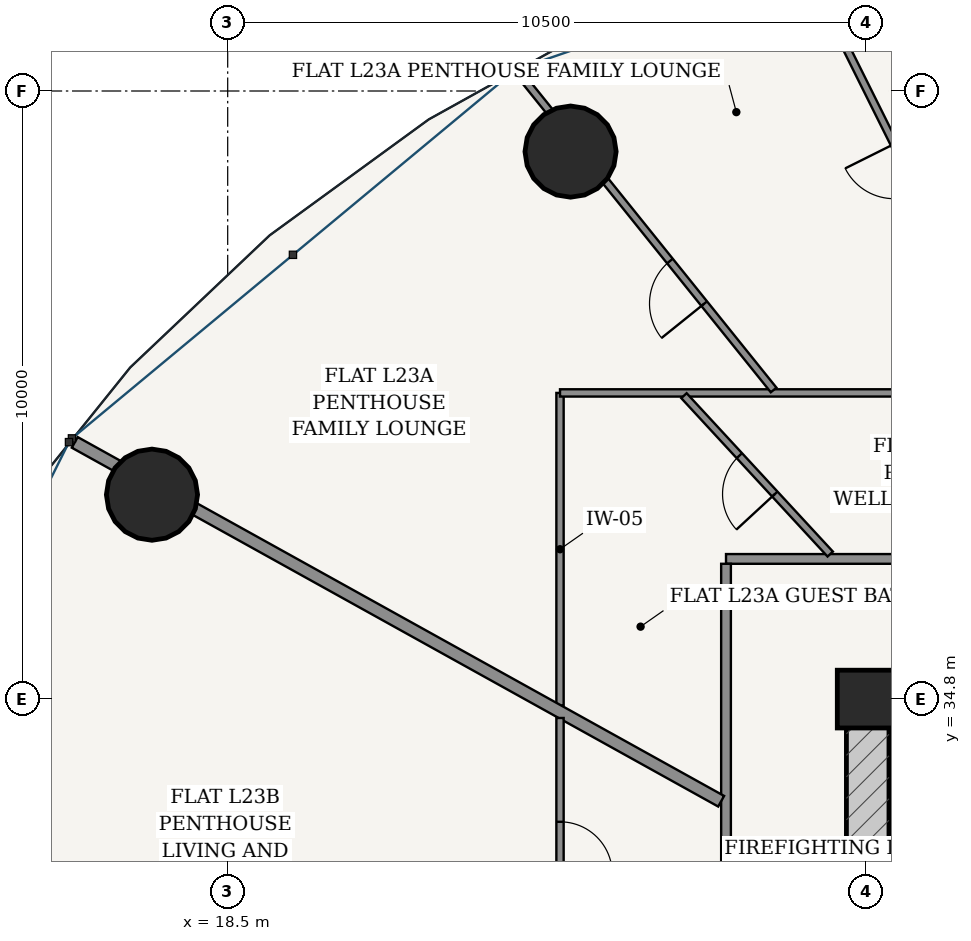
"""IFC4 building model, lengths in metres.
Left out: names, types, materials, properties, quantities, classifications, styles, units other than length and angle.
Written with IfcOpenShell. Run it as: python <this file> out.ifc"""

import sys

from ifc_helpers import new_model, si_unit, direction, frame, frame_2d, origin, origin_2d, place, context, subcontext, project, spatial, rectangle, hollow_circle, extrude, source, transform, mapped, element, fill, save


model = new_model("IFC4")
c1 = context("Model", 3, precision=1e-05, world=origin(), true_north=direction((-0.2419218956, 0.970295726276)))
c2 = subcontext(c1, "Body", "Model", "MODEL_VIEW")
j1 = project(units=[si_unit("LENGTHUNIT", "METRE"), si_unit("PLANEANGLEUNIT", "RADIAN")], contexts=[c1])
p1 = place(None, origin())
s1 = spatial("IfcSite", under=j1, at=p1, CompositionType="ELEMENT")
p2 = place(p1, origin())
s2 = spatial("IfcBuilding", under=s1, at=p2, CompositionType="ELEMENT")
p3 = place(p2, frame((0.0, 0.0, 90.6)))
s3 = spatial("IfcBuildingStorey", under=s2, at=p3, CompositionType="ELEMENT", Elevation=90.6)
p4 = place(p3, frame((29.0, 34.8, 0.0), z_axis=(0.0, 0.0, 1.0), x_axis=(1.0, 0.0, 0.0)))
e1 = element("IfcColumn", 1, at=p4, inside=s3, PredefinedType="COLUMN", context=c2, shape_type="SweptSolid", body=[
    extrude(rectangle(XDim=0.95, YDim=0.95, at=origin_2d()), origin(), (0.0, 0.0, 1.0), 3.6),
])
p5 = place(p3, frame((28.675, 34.775, 0.0), z_axis=(0.0, 0.0, 1.0), x_axis=(1.0, 0.0, 0.0)))
e2 = element("IfcWall", 2, at=p5, inside=s3, PredefinedType="SHEAR", context=c2, shape_type="SweptSolid", body=[
    extrude(rectangle(XDim=18.65, YDim=0.7, at=frame_2d((9.325, 0.0))), origin(), (0.0, 0.0, 1.0), 3.325),
])
p6 = place(p5, frame((8.9, 0.0, 0.0)))
e3 = element("IfcOpeningElement", 3, at=p6, cuts=e2, PredefinedType="OPENING", context=c2, shape_type="SweptSolid", body=[
    extrude(rectangle(XDim=0.85, YDim=2.1, at=frame_2d((0.425, 1.05))), frame((0.0, 0.36, 0.0), z_axis=(0.0, -1.0, 0.0), x_axis=(1.0, 0.0, 0.0)), (0.0, 0.0, 1.0), 0.72),
])
p7 = place(p3, frame((29.025, 19.175, 0.0), z_axis=(0.0, 0.0, 1.0), x_axis=(0.0, 1.0, 0.0)))
e4 = element("IfcWall", 4, at=p7, inside=s3, PredefinedType="SHEAR", context=c2, shape_type="SweptSolid", body=[
    extrude(rectangle(XDim=15.25, YDim=0.7, at=frame_2d((7.625, 0.0))), origin(), (0.0, 0.0, 1.0), 3.325),
])
p8 = place(p7, frame((9.875, 0.0, 0.0)))
e5 = element("IfcOpeningElement", 5, at=p8, cuts=e4, PredefinedType="OPENING", context=c2, shape_type="SweptSolid", body=[
    extrude(rectangle(XDim=1.5, YDim=2.2, at=frame_2d((0.75, 1.1))), frame((0.0, 0.36, 0.0), z_axis=(0.0, -1.0, 0.0), x_axis=(1.0, 0.0, 0.0)), (0.0, 0.0, 1.0), 0.72),
])
for number, where, z_axis, x_axis in (
    (6, (24.138, 43.803, 0.0), (0.0, 0.0, 1.0), (1.0, 0.0, 0.0)),
    (7, (17.255, 38.161, 0.0), (0.0, 0.0, 1.0), (1.0, 0.0, 0.0)),
):
    element("IfcColumn", number, at=place(p3, frame(where, z_axis=z_axis, x_axis=x_axis)), inside=s3, PredefinedType="COLUMN", context=c2, shape_type="SweptSolid", body=[
        extrude(hollow_circle(Radius=0.75, WallThickness=0.045, at=origin_2d()), origin(), (0.0, 0.0, 1.0), 3.6),
    ])
p9 = place(p3, frame((26.695, 37.105, 0.0), z_axis=(0.0, 0.0, 1.0), x_axis=(1.0, 0.0, 0.0)))
e8 = element("IfcWall", 8, at=p9, inside=s3, PredefinedType="PARTITIONING", context=c2, shape_type="SweptSolid", body=[
    extrude(rectangle(XDim=22.61, YDim=0.16, at=frame_2d((11.305, 0.0))), origin(), (0.0, 0.0, 1.0), 2.767),
])
p10 = place(p9, frame((18.058, 0.0, 0.0)))
e9 = element("IfcOpeningElement", 9, at=p10, cuts=e8, PredefinedType="OPENING", context=c2, shape_type="SweptSolid", body=[
    extrude(rectangle(XDim=0.98, YDim=2.2, at=frame_2d((0.49, 1.1))), frame((0.0, 0.09, 0.0), z_axis=(0.0, -1.0, 0.0), x_axis=(1.0, 0.0, 0.0)), (0.0, 0.0, 1.0), 0.18),
])
p11 = place(p3, frame((26.695, 16.575, 0.0), z_axis=(0.0, 0.0, 1.0), x_axis=(0.0, 1.0, 0.0)))
e10 = element("IfcWall", 10, at=p11, inside=s3, PredefinedType="PARTITIONING", context=c2, shape_type="SweptSolid", body=[
    extrude(rectangle(XDim=20.45, YDim=0.16, at=frame_2d((10.225, 0.0))), origin(), (0.0, 0.0, 1.0), 2.767),
])
p12 = place(p3, frame((23.965, 34.693, 0.0), z_axis=(0.0, 0.0, 1.0), x_axis=(0.0, 1.0, 0.0)))
e11 = element("IfcWall", 11, at=p12, inside=s3, PredefinedType="PARTITIONING", context=c2, shape_type="SweptSolid", body=[
    extrude(rectangle(XDim=5.142, YDim=0.12, at=frame_2d((2.571, 0.0))), origin(), (0.0, 0.0, 1.0), 3.004),
])
p13 = place(p3, frame((23.965, 39.835, 0.0), z_axis=(0.0, 0.0, 1.0), x_axis=(1.0, 0.0, 0.0)))
e12 = element("IfcWall", 12, at=p13, inside=s3, PredefinedType="PARTITIONING", context=c2, shape_type="SweptSolid", body=[
    extrude(rectangle(XDim=28.07, YDim=0.12, at=frame_2d((14.035, 0.0))), origin(), (0.0, 0.0, 1.0), 2.767),
])
p14 = place(p13, frame((23.442, 0.0, 0.0)))
e13 = element("IfcOpeningElement", 13, at=p14, cuts=e12, PredefinedType="OPENING", context=c2, shape_type="SweptSolid", body=[
    extrude(rectangle(XDim=0.9, YDim=2.15, at=frame_2d((0.45, 1.075))), frame((0.0, 0.07, 0.0), z_axis=(0.0, -1.0, 0.0), x_axis=(1.0, 0.0, 0.0)), (0.0, 0.0, 1.0), 0.14),
])
p15 = place(p3, frame((31.474, 39.89, 0.0), z_axis=(0.0, 0.0, 1.0), x_axis=(-0.446167584581, 0.894949432353, 0.0)))
e14 = element("IfcWall", 14, at=p15, inside=s3, PredefinedType="PARTITIONING", context=c2, shape_type="SweptSolid", body=[
    extrude(rectangle(XDim=8.125, YDim=0.12, at=frame_2d((4.062, 0.0))), origin(), (0.0, 0.0, 1.0), 2.767),
])
p16 = place(p15, frame((3.612, 0.0, 0.0)))
e15 = element("IfcOpeningElement", 15, at=p16, cuts=e14, PredefinedType="OPENING", context=c2, shape_type="SweptSolid", body=[
    extrude(rectangle(XDim=0.9, YDim=2.15, at=frame_2d((0.45, 1.075))), frame((0.0, 0.07, 0.0), z_axis=(0.0, -1.0, 0.0), x_axis=(1.0, 0.0, 0.0)), (0.0, 0.0, 1.0), 0.14),
])
p17 = place(p3, frame((27.478, 39.883, 0.0), z_axis=(0.0, 0.0, 1.0), x_axis=(-0.62672583251, 0.779239841682, 0.0)))
e16 = element("IfcWall", 16, at=p17, inside=s3, PredefinedType="PARTITIONING", context=c2, shape_type="SweptSolid", body=[
    extrude(rectangle(XDim=6.678, YDim=0.12, at=frame_2d((3.339, 0.0))), origin(), (0.0, 0.0, 1.0), 2.767),
])
p18 = place(p17, frame((1.821, 0.0, 0.0)))
e17 = element("IfcOpeningElement", 17, at=p18, cuts=e16, PredefinedType="OPENING", context=c2, shape_type="SweptSolid", body=[
    extrude(rectangle(XDim=0.9, YDim=2.15, at=frame_2d((0.45, 1.075))), frame((0.0, 0.07, 0.0), z_axis=(0.0, -1.0, 0.0), x_axis=(1.0, 0.0, 0.0)), (0.0, 0.0, 1.0), 0.14),
])
p19 = place(p3, frame((28.409, 37.185, 0.0), z_axis=(0.0, 0.0, 1.0), x_axis=(-0.678451695105, 0.734645014554, 0.0)))
e18 = element("IfcWall", 18, at=p19, inside=s3, PredefinedType="PARTITIONING", context=c2, shape_type="SweptSolid", body=[
    extrude(rectangle(XDim=3.545, YDim=0.12, at=frame_2d((1.772, 0.0))), origin(), (0.0, 0.0, 1.0), 2.767),
])
p20 = place(p19, frame((1.343, 0.0, 0.0)))
e19 = element("IfcOpeningElement", 19, at=p20, cuts=e18, PredefinedType="OPENING", context=c2, shape_type="SweptSolid", body=[
    extrude(rectangle(XDim=0.86, YDim=2.15, at=frame_2d((0.43, 1.075))), frame((0.0, 0.07, 0.0), z_axis=(0.0, -1.0, 0.0), x_axis=(1.0, 0.0, 0.0)), (0.0, 0.0, 1.0), 0.14),
])
p21 = place(p3, frame((26.615, 33.12, 0.0), z_axis=(0.0, 0.0, 1.0), x_axis=(-0.874319192772, 0.485351366692, 0.0)))
e20 = element("IfcWall", 20, at=p21, inside=s3, PredefinedType="PARTITIONING", context=c2, shape_type="SweptSolid", body=[
    extrude(rectangle(XDim=12.158, YDim=0.2, at=frame_2d((6.079, 0.0))), origin(), (0.0, 0.0, 1.0), 2.767),
])
p22 = place(p3, frame((23.965, 13.765, 0.0), z_axis=(0.0, 0.0, 1.0), x_axis=(0.0, 1.0, 0.0)))
e21 = element("IfcWall", 21, at=p22, inside=s3, PredefinedType="PARTITIONING", context=c2, shape_type="SweptSolid", body=[
    extrude(rectangle(XDim=20.725, YDim=0.12, at=frame_2d((10.362, 0.0))), origin(), (0.0, 0.0, 1.0), 2.767),
])
p23 = place(p22, frame((9.401, 0.0, 0.0)))
e22 = element("IfcOpeningElement", 22, at=p23, cuts=e21, PredefinedType="OPENING", context=c2, shape_type="SweptSolid", body=[
    extrude(rectangle(XDim=0.9, YDim=2.15, at=frame_2d((0.45, 1.075))), frame((0.0, 0.07, 0.0), z_axis=(0.0, -1.0, 0.0), x_axis=(1.0, 0.0, 0.0)), (0.0, 0.0, 1.0), 0.14),
])
p24 = place(p22, frame((18.157, 0.0, 0.0)))
e23 = element("IfcOpeningElement", 23, at=p24, cuts=e21, PredefinedType="OPENING", context=c2, shape_type="SweptSolid", body=[
    extrude(rectangle(XDim=0.86, YDim=2.15, at=frame_2d((0.43, 1.075))), frame((0.0, 0.07, 0.0), z_axis=(0.0, -1.0, 0.0), x_axis=(1.0, 0.0, 0.0)), (0.0, 0.0, 1.0), 0.14),
])
p25 = place(p22, frame((14.376, 0.0, 0.0)))
e24 = element("IfcOpeningElement", 24, at=p25, cuts=e21, PredefinedType="OPENING", context=c2, shape_type="SweptSolid", body=[
    extrude(rectangle(XDim=0.9, YDim=2.15, at=frame_2d((0.45, 1.075))), frame((0.0, 0.07, 0.0), z_axis=(0.0, -1.0, 0.0), x_axis=(1.0, 0.0, 0.0)), (0.0, 0.0, 1.0), 0.14),
])
m1 = source(origin(), c2, "Body", "SweptSolid", [
    extrude(rectangle(XDim=0.86, YDim=2.15, at=frame_2d((0.43, 1.075))), frame((0.0, 0.025, 0.0), z_axis=(0.0, -1.0, 0.0), x_axis=(1.0, 0.0, 0.0)), (0.0, 0.0, 1.0), 0.05),
])
p26 = place(p20, origin())
e25 = element("IfcDoor", 25, at=p26, inside=s3, OperationType="SINGLE_SWING_LEFT", PredefinedType="DOOR", context=c2, shape_type="MappedRepresentation", body=[
    mapped(m1, transform((0.0, 0.0, 0.0), scale=1.0)),
])
fill(e19, e25)
m2 = source(origin(), c2, "Body", "SweptSolid", [
    extrude(rectangle(XDim=0.9, YDim=2.15, at=frame_2d((0.45, 1.075))), frame((0.0, 0.025, 0.0), z_axis=(0.0, -1.0, 0.0), x_axis=(1.0, 0.0, 0.0)), (0.0, 0.0, 1.0), 0.05),
])
p27 = place(p18, origin())
e26 = element("IfcDoor", 26, at=p27, inside=s3, OperationType="SINGLE_SWING_LEFT", PredefinedType="DOOR", context=c2, shape_type="MappedRepresentation", body=[
    mapped(m2, transform((0.0, 0.0, 0.0), scale=1.0)),
])
fill(e17, e26)
p28 = place(p24, frame((0.86, 0.0, 0.0), z_axis=(0.0, 0.0, 1.0), x_axis=(-1.0, 0.0, 0.0)))
e27 = element("IfcDoor", 27, at=p28, inside=s3, OperationType="SINGLE_SWING_RIGHT", PredefinedType="DOOR", context=c2, shape_type="MappedRepresentation", body=[
    mapped(m1, transform((0.0, 0.0, 0.0), scale=1.0)),
])
fill(e23, e27)
save(model, sys.argv[1])
